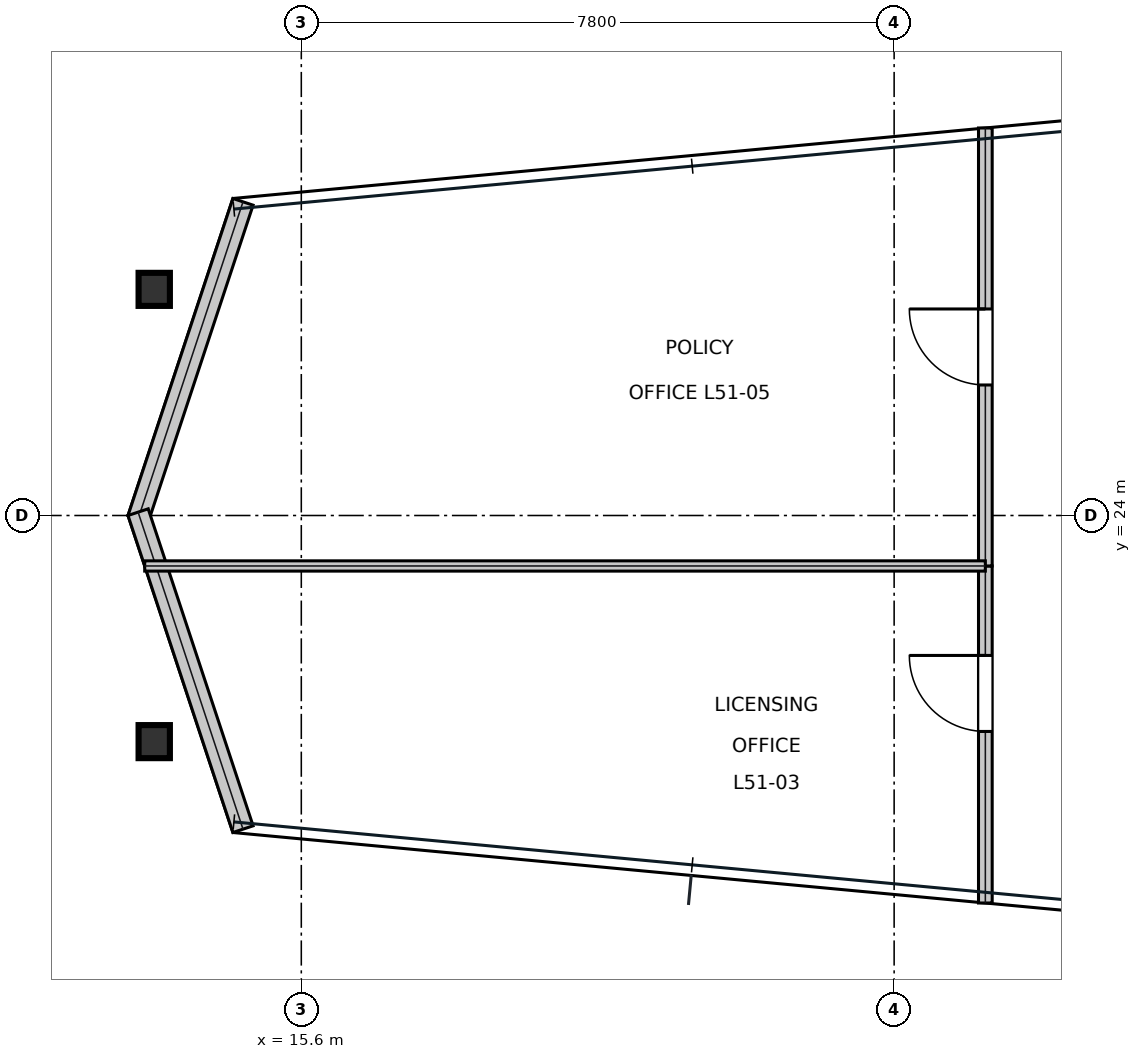
"""IFC4 building model, lengths in metres.
Left out: names, types, materials, properties, quantities, classifications, styles, units other than length and angle.
Written with IfcOpenShell. Run it as: python <this file> out.ifc"""

import sys

from ifc_helpers import new_model, si_unit, direction, frame, frame_2d, origin, origin_2d, place, context, subcontext, project, spatial, rectangle, i_section, extrude, element, fill, save


model = new_model("IFC4")
c1 = context("Model", 3, precision=1e-05, world=origin(), true_north=direction((0.0, 1.0)))
c2 = subcontext(c1, "Body", "Model", "MODEL_VIEW")
j1 = project(units=[si_unit("LENGTHUNIT", "METRE"), si_unit("PLANEANGLEUNIT", "RADIAN")], contexts=[c1])
p1 = place(None, origin())
s1 = spatial("IfcSite", under=j1, at=p1, CompositionType="ELEMENT")
p2 = place(p1, origin())
s2 = spatial("IfcBuilding", under=s1, at=p2, CompositionType="ELEMENT")
p3 = place(p2, frame((0.0, 0.0, 220.2)))
s3 = spatial("IfcBuildingStorey", under=s2, at=p3, CompositionType="ELEMENT", Elevation=220.2)
for number, where, z_axis, x_axis in (
    (1, (13.665, 21.025, 0.016), (0.0, 0.0, 1.0), (1.0, 0.0, 0.0)),
    (2, (13.665, 26.975, 0.016), (0.0, 0.0, 1.0), (1.0, 0.0, 0.0)),
):
    element("IfcColumn", number, at=place(p3, frame(where, z_axis=z_axis, x_axis=x_axis)), inside=s3, PredefinedType="COLUMN", context=c2, shape_type="SweptSolid", body=[
        extrude(i_section(OverallWidth=0.412, OverallDepth=0.435, WebThickness=0.036, FlangeThickness=0.058, at=origin_2d()), origin(), (0.0, 0.0, 1.0), 4.018),
    ])
for number, where, z_axis, x_axis in (
    (3, (14.833, 28.127, 0.0), (0.0, 0.0, 1.0), (-0.314, -0.949, 0.0)),
    (4, (13.453, 24.044, 0.0), (0.0, 0.0, 1.0), (0.314, -0.949, 0.0)),
):
    element("IfcWall", number, at=place(p3, frame(where, z_axis=z_axis, x_axis=x_axis)), inside=s3, PredefinedType="STANDARD", context=c2, shape_type="SweptSolid", body=[
        extrude(rectangle(XDim=4.393, YDim=0.28, at=frame_2d((2.197, 0.0))), origin(), (0.0, 0.0, 1.0), 3.241),
    ])
p4 = place(p3, frame((24.6, 18.902, 0.0), z_axis=(0.0, 0.0, 1.0), x_axis=(0.0, 1.0, 0.0)))
e5 = element("IfcWall", 5, at=p4, inside=s3, PredefinedType="SOLIDWALL", context=c2, shape_type="SweptSolid", body=[
    extrude(rectangle(XDim=4.434, YDim=0.18, at=frame_2d((2.217, 0.0))), origin(), (0.0, 0.0, 1.0), 3.241),
])
p5 = place(p4, frame((2.257, 0.0, 0.0)))
e6 = element("IfcOpeningElement", 6, at=p5, cuts=e5, PredefinedType="OPENING", context=c2, shape_type="SweptSolid", body=[
    extrude(rectangle(XDim=1.0, YDim=2.15, at=frame_2d((0.5, 1.075))), frame((0.0, 0.1, 0.0), z_axis=(0.0, -1.0, 0.0), x_axis=(1.0, 0.0, 0.0)), (0.0, 0.0, 1.0), 0.2),
])
p6 = place(p3, frame((24.6, 23.336, 0.0), z_axis=(0.0, 0.0, 1.0), x_axis=(0.0, 1.0, 0.0)))
e7 = element("IfcWall", 7, at=p6, inside=s3, PredefinedType="SOLIDWALL", context=c2, shape_type="SweptSolid", body=[
    extrude(rectangle(XDim=5.762, YDim=0.18, at=frame_2d((2.881, 0.0))), origin(), (0.0, 0.0, 1.0), 3.241),
])
p7 = place(p6, frame((2.381, 0.0, 0.0)))
e8 = element("IfcOpeningElement", 8, at=p7, cuts=e7, PredefinedType="OPENING", context=c2, shape_type="SweptSolid", body=[
    extrude(rectangle(XDim=1.0, YDim=2.15, at=frame_2d((0.5, 1.075))), frame((0.0, 0.1, 0.0), z_axis=(0.0, -1.0, 0.0), x_axis=(1.0, 0.0, 0.0)), (0.0, 0.0, 1.0), 0.2),
])
p8 = place(p3, frame((13.54, 23.336, 0.0), z_axis=(0.0, 0.0, 1.0), x_axis=(1.0, 0.0, 0.0)))
e9 = element("IfcWall", 9, at=p8, inside=s3, PredefinedType="PARTITIONING", context=c2, shape_type="SweptSolid", body=[
    extrude(rectangle(XDim=11.06, YDim=0.135, at=frame_2d((5.53, 0.0))), origin(), (0.0, 0.0, 1.0), 3.319),
])
p9 = place(p5, origin())
e10 = element("IfcDoor", 10, at=p9, inside=s3, OperationType="SINGLE_SWING_RIGHT", PredefinedType="DOOR", context=c2, shape_type="SweptSolid", body=[
    extrude(rectangle(XDim=1.0, YDim=2.15, at=frame_2d((0.5, 1.075))), frame((0.0, 0.025, 0.0), z_axis=(0.0, -1.0, 0.0), x_axis=(1.0, 0.0, 0.0)), (0.0, 0.0, 1.0), 0.05),
])
fill(e6, e10)
p10 = place(p7, origin())
e11 = element("IfcDoor", 11, at=p10, inside=s3, OperationType="SINGLE_SWING_RIGHT", PredefinedType="DOOR", context=c2, shape_type="SweptSolid", body=[
    extrude(rectangle(XDim=1.0, YDim=2.15, at=frame_2d((0.5, 1.075))), frame((0.0, 0.025, 0.0), z_axis=(0.0, -1.0, 0.0), x_axis=(1.0, 0.0, 0.0)), (0.0, 0.0, 1.0), 0.05),
])
fill(e8, e11)
save(model, sys.argv[1])
